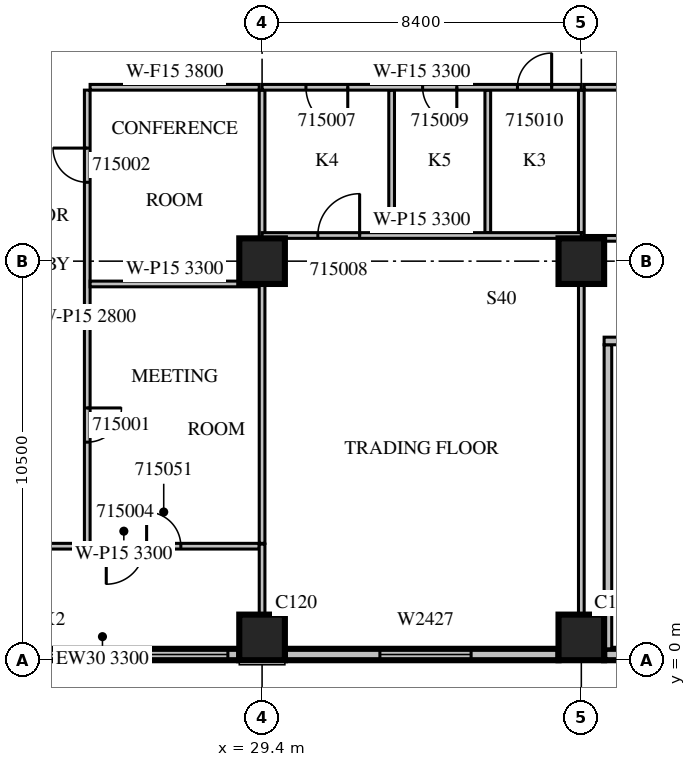
"""IFC4 building model, lengths in metres.
Left out: names, types, materials, properties, quantities, classifications, styles, units other than length and angle.
Written with IfcOpenShell. Run it as: python <this file> out.ifc"""

import sys

from ifc_helpers import new_model, si_unit, direction, frame, frame_2d, origin, origin_2d, place, context, subcontext, project, spatial, rectangle, extrude, source, transform, mapped, element, fill, save


model = new_model("IFC4")
c1 = context("Model", 3, precision=1e-05, world=origin(), true_north=direction((0.0, 1.0)))
c2 = subcontext(c1, "Body", "Model", "MODEL_VIEW")
j1 = project(units=[si_unit("LENGTHUNIT", "METRE"), si_unit("PLANEANGLEUNIT", "RADIAN")], contexts=[c1])
p1 = place(None, origin())
s1 = spatial("IfcSite", under=j1, at=p1, CompositionType="ELEMENT")
p2 = place(p1, origin())
s2 = spatial("IfcBuilding", under=s1, at=p2, CompositionType="ELEMENT")
p3 = place(p2, frame((0.0, 0.0, 74.1)))
s3 = spatial("IfcBuildingStorey", under=s2, at=p3, CompositionType="ELEMENT", Elevation=74.1)
m1 = source(origin(), c2, "Body", "SweptSolid", [
    extrude(rectangle(XDim=1.2, YDim=1.2, at=origin_2d()), origin(), (0.0, 0.0, 1.0), 4.2),
])
for number, where, z_axis, x_axis in (
    (1, (29.4, 0.6, 0.0), (0.0, 0.0, 1.0), (1.0, 0.0, 0.0)),
    (2, (37.8, 0.6, 0.0), (0.0, 0.0, 1.0), (1.0, 0.0, 0.0)),
    (3, (29.4, 10.5, 0.0), (0.0, 0.0, 1.0), (1.0, 0.0, 0.0)),
    (4, (37.8, 10.5, 0.0), (0.0, 0.0, 1.0), (1.0, 0.0, 0.0)),
):
    element("IfcColumn", number, at=place(p3, frame(where, z_axis=z_axis, x_axis=x_axis)), inside=s3, PredefinedType="COLUMN", context=c2, shape_type="MappedRepresentation", body=[
        mapped(m1, transform((0.0, 0.0, 0.0), scale=1.0)),
    ])
m2 = source(origin(), c2, "Body", "SweptSolid", [
    extrude(rectangle(XDim=7.2, YDim=0.3, at=frame_2d((3.6, 0.0))), origin(), (0.0, 0.0, 1.0), 3.3),
])
p4 = place(p3, frame((21.6, 0.15, 0.0), z_axis=(0.0, 0.0, 1.0), x_axis=(1.0, 0.0, 0.0)))
e5 = element("IfcWall", 5, at=p4, inside=s3, PredefinedType="STANDARD", context=c2, shape_type="MappedRepresentation", body=[
    mapped(m2, transform((0.0, 0.0, 0.0), scale=1.0)),
])
m3 = source(origin(), c2, "Body", "SweptSolid", [
    extrude(rectangle(XDim=2.4, YDim=2.7, at=frame_2d((1.2, 1.35))), frame((0.0, 0.16, 0.0), z_axis=(0.0, -1.0, 0.0), x_axis=(1.0, 0.0, 0.0)), (0.0, 0.0, 1.0), 0.32),
])
p5 = place(p4, frame((0.3, 0.0, 0.6)))
e6 = element("IfcOpeningElement", 6, at=p5, cuts=e5, PredefinedType="OPENING", context=c2, shape_type="MappedRepresentation", body=[
    mapped(m3, transform((0.0, 0.0, 0.0), scale=1.0)),
])
p6 = place(p4, frame((4.5, 0.0, 0.6)))
e7 = element("IfcOpeningElement", 7, at=p6, cuts=e5, PredefinedType="OPENING", context=c2, shape_type="MappedRepresentation", body=[
    mapped(m3, transform((0.0, 0.0, 0.0), scale=1.0)),
])
m4 = source(origin(), c2, "Body", "SweptSolid", [
    extrude(rectangle(XDim=7.2, YDim=0.3, at=frame_2d((3.6, 0.0))), origin(), (0.0, 0.0, 1.0), 3.8),
])
p7 = place(p3, frame((30.0, 0.15, 0.0), z_axis=(0.0, 0.0, 1.0), x_axis=(1.0, 0.0, 0.0)))
e8 = element("IfcWall", 8, at=p7, inside=s3, PredefinedType="STANDARD", context=c2, shape_type="MappedRepresentation", body=[
    mapped(m4, transform((0.0, 0.0, 0.0), scale=1.0)),
])
p8 = place(p7, frame((2.5, 0.0, 0.6)))
e9 = element("IfcOpeningElement", 9, at=p8, cuts=e8, PredefinedType="OPENING", context=c2, shape_type="MappedRepresentation", body=[
    mapped(m3, transform((0.0, 0.0, 0.0), scale=1.0)),
])
m5 = source(origin(), c2, "Body", "SweptSolid", [
    extrude(rectangle(XDim=1.8, YDim=0.3, at=frame_2d((0.9, 0.0))), origin(), (0.0, 0.0, 1.0), 3.8),
])
p9 = place(p3, frame((38.4, 0.15, 0.0), z_axis=(0.0, 0.0, 1.0), x_axis=(1.0, 0.0, 0.0)))
e10 = element("IfcWall", 10, at=p9, inside=s3, PredefinedType="STANDARD", context=c2, shape_type="MappedRepresentation", body=[
    mapped(m5, transform((0.0, 0.0, 0.0), scale=1.0)),
])
m6 = source(origin(), c2, "Body", "SweptSolid", [
    extrude(rectangle(XDim=8.0, YDim=0.2, at=frame_2d((4.0, 0.0))), origin(), (0.0, 0.0, 1.0), 3.8),
])
p10 = place(p3, frame((38.5, 0.3, 0.0), z_axis=(0.0, 0.0, 1.0), x_axis=(0.0, 1.0, 0.0)))
e11 = element("IfcWall", 11, at=p10, inside=s3, PredefinedType="PARTITIONING", context=c2, shape_type="MappedRepresentation", body=[
    mapped(m6, transform((0.0, 0.0, 0.0), scale=1.0)),
])
m7 = source(origin(), c2, "Body", "SweptSolid", [
    extrude(rectangle(XDim=5.45, YDim=0.2, at=frame_2d((2.725, 0.0))), origin(), (0.0, 0.0, 1.0), 3.8),
])
p11 = place(p3, frame((38.4, 8.4, 0.0), z_axis=(0.0, 0.0, 1.0), x_axis=(1.0, 0.0, 0.0)))
e12 = element("IfcWall", 12, at=p11, inside=s3, PredefinedType="PARTITIONING", context=c2, shape_type="MappedRepresentation", body=[
    mapped(m7, transform((0.0, 0.0, 0.0), scale=1.0)),
])
m8 = source(origin(), c2, "Body", "SweptSolid", [
    extrude(rectangle(XDim=1.2, YDim=2.1, at=frame_2d((0.6, 1.05))), frame((0.0, 0.11, 0.0), z_axis=(0.0, -1.0, 0.0), x_axis=(1.0, 0.0, 0.0)), (0.0, 0.0, 1.0), 0.22),
])
p12 = place(p11, frame((0.4, 0.0, 0.0)))
e13 = element("IfcOpeningElement", 13, at=p12, cuts=e12, PredefinedType="OPENING", context=c2, shape_type="MappedRepresentation", body=[
    mapped(m8, transform((0.0, 0.0, 0.0), scale=1.0)),
])
m9 = source(origin(), c2, "Body", "SweptSolid", [
    extrude(rectangle(XDim=0.9, YDim=2.1, at=frame_2d((0.45, 1.05))), frame((0.0, 0.11, 0.0), z_axis=(0.0, -1.0, 0.0), x_axis=(1.0, 0.0, 0.0)), (0.0, 0.0, 1.0), 0.22),
])
p13 = place(p11, frame((3.25, 0.0, 0.0)))
e14 = element("IfcOpeningElement", 14, at=p13, cuts=e12, PredefinedType="OPENING", context=c2, shape_type="MappedRepresentation", body=[
    mapped(m9, transform((0.0, 0.0, 0.0), scale=1.0)),
])
m10 = source(origin(), c2, "Body", "SweptSolid", [
    extrude(rectangle(XDim=11.925, YDim=0.15, at=frame_2d((5.963, 0.0))), origin(), (0.0, 0.0, 1.0), 2.8),
])
p14 = place(p3, frame((24.8, 15.0, 0.0), z_axis=(0.0, 0.0, 1.0), x_axis=(0.0, -1.0, 0.0)))
e15 = element("IfcWall", 15, at=p14, inside=s3, PredefinedType="PARTITIONING", context=c2, shape_type="MappedRepresentation", body=[
    mapped(m10, transform((0.0, 0.0, 0.0), scale=1.0)),
])
m11 = source(origin(), c2, "Body", "SweptSolid", [
    extrude(rectangle(XDim=0.9, YDim=2.1, at=frame_2d((0.45, 1.05))), frame((0.0, 0.085, 0.0), z_axis=(0.0, -1.0, 0.0), x_axis=(1.0, 0.0, 0.0)), (0.0, 0.0, 1.0), 0.17),
])
p15 = place(p14, frame((8.363, 0.0, 0.0)))
e16 = element("IfcOpeningElement", 16, at=p15, cuts=e15, PredefinedType="OPENING", context=c2, shape_type="MappedRepresentation", body=[
    mapped(m11, transform((0.0, 0.0, 0.0), scale=1.0)),
])
p16 = place(p14, frame((1.525, 0.0, 0.0)))
e17 = element("IfcOpeningElement", 17, at=p16, cuts=e15, PredefinedType="OPENING", context=c2, shape_type="MappedRepresentation", body=[
    mapped(m11, transform((0.0, 0.0, 0.0), scale=1.0)),
])
p17 = place(p3, frame((29.325, 9.9, 0.0), z_axis=(0.0, 0.0, 1.0), x_axis=(-1.0, 0.0, 0.0)))
e18 = element("IfcWall", 18, at=p17, inside=s3, PredefinedType="PARTITIONING", context=c2, shape_type="SweptSolid", body=[
    extrude(rectangle(XDim=4.45, YDim=0.15, at=frame_2d((2.225, 0.0))), origin(), (0.0, 0.0, 1.0), 3.3),
])
m12 = source(origin(), c2, "Body", "SweptSolid", [
    extrude(rectangle(XDim=4.45, YDim=0.15, at=frame_2d((2.225, 0.0))), origin(), (0.0, 0.0, 1.0), 3.8),
])
p18 = place(p3, frame((29.325, 15.075, 0.0), z_axis=(0.0, 0.0, 1.0), x_axis=(-1.0, 0.0, 0.0)))
e19 = element("IfcWall", 19, at=p18, inside=s3, PredefinedType="PARTITIONING", context=c2, shape_type="MappedRepresentation", body=[
    mapped(m12, transform((0.0, 0.0, 0.0), scale=1.0)),
])
m13 = source(origin(), c2, "Body", "SweptSolid", [
    extrude(rectangle(XDim=6.826, YDim=0.15, at=frame_2d((3.413, 0.0))), origin(), (0.0, 0.0, 1.0), 3.8),
])
p19 = place(p3, frame((29.4, 3.075, 0.0), z_axis=(0.0, 0.0, 1.0), x_axis=(0.0, 1.0, 0.0)))
e20 = element("IfcWall", 20, at=p19, inside=s3, PredefinedType="PARTITIONING", context=c2, shape_type="MappedRepresentation", body=[
    mapped(m13, transform((0.0, 0.0, 0.0), scale=1.0)),
])
m14 = source(origin(), c2, "Body", "SweptSolid", [
    extrude(rectangle(XDim=3.901, YDim=0.15, at=frame_2d((1.95, 0.0))), origin(), (0.0, 0.0, 1.0), 3.8),
])
p20 = place(p3, frame((29.4, 11.099, 0.0), z_axis=(0.0, 0.0, 1.0), x_axis=(0.0, 1.0, 0.0)))
e21 = element("IfcWall", 21, at=p20, inside=s3, PredefinedType="PARTITIONING", context=c2, shape_type="MappedRepresentation", body=[
    mapped(m14, transform((0.0, 0.0, 0.0), scale=1.0)),
])
m15 = source(origin(), c2, "Body", "SweptSolid", [
    extrude(rectangle(XDim=7.125, YDim=0.15, at=frame_2d((3.562, 0.0))), origin(), (0.0, 0.0, 1.0), 3.3),
])
p21 = place(p3, frame((22.2, 3.0, 0.0), z_axis=(0.0, 0.0, 1.0), x_axis=(1.0, 0.0, 0.0)))
e22 = element("IfcWall", 22, at=p21, inside=s3, PredefinedType="PARTITIONING", context=c2, shape_type="MappedRepresentation", body=[
    mapped(m15, transform((0.0, 0.0, 0.0), scale=1.0)),
])
m16 = source(origin(), c2, "Body", "SweptSolid", [
    extrude(rectangle(XDim=1.0, YDim=2.1, at=frame_2d((0.5, 1.05))), frame((0.0, 0.085, 0.0), z_axis=(0.0, -1.0, 0.0), x_axis=(1.0, 0.0, 0.0)), (0.0, 0.0, 1.0), 0.17),
])
p22 = place(p21, frame((3.1, 0.0, 0.0)))
e23 = element("IfcOpeningElement", 23, at=p22, cuts=e22, PredefinedType="OPENING", context=c2, shape_type="MappedRepresentation", body=[
    mapped(m16, transform((0.0, 0.0, 0.0), scale=1.0)),
])
p23 = place(p21, frame((4.162, 0.0, 0.0)))
e24 = element("IfcOpeningElement", 24, at=p23, cuts=e22, PredefinedType="OPENING", context=c2, shape_type="MappedRepresentation", body=[
    mapped(m11, transform((0.0, 0.0, 0.0), scale=1.0)),
])
m17 = source(origin(), c2, "Body", "SweptSolid", [
    extrude(rectangle(XDim=6.45, YDim=0.15, at=frame_2d((3.225, 0.0))), origin(), (0.0, 0.0, 1.0), 3.8),
])
p24 = place(p3, frame((37.875, 11.1, 0.0), z_axis=(0.0, 0.0, 1.0), x_axis=(1.0, 0.0, 0.0)))
e25 = element("IfcWall", 25, at=p24, inside=s3, PredefinedType="PARTITIONING", context=c2, shape_type="MappedRepresentation", body=[
    mapped(m17, transform((0.0, 0.0, 0.0), scale=1.0)),
])
p25 = place(p3, frame((44.325, 15.075, 0.0), z_axis=(0.0, 0.0, 1.0), x_axis=(-1.0, 0.0, 0.0)))
e26 = element("IfcWall", 26, at=p25, inside=s3, PredefinedType="PARTITIONING", context=c2, shape_type="MappedRepresentation", body=[
    mapped(m17, transform((0.0, 0.0, 0.0), scale=1.0)),
])
p26 = place(p25, frame((2.812, 0.0, 0.0)))
e27 = element("IfcOpeningElement", 27, at=p26, cuts=e26, PredefinedType="OPENING", context=c2, shape_type="MappedRepresentation", body=[
    mapped(m11, transform((0.0, 0.0, 0.0), scale=1.0)),
])
m18 = source(origin(), c2, "Body", "SweptSolid", [
    extrude(rectangle(XDim=3.75, YDim=0.15, at=frame_2d((1.875, 0.0))), origin(), (0.0, 0.0, 1.0), 3.8),
])
for number, where, z_axis, x_axis in (
    (28, (32.809, 11.25, 0.0), (0.0, 0.0, 1.0), (0.0, 1.0, 0.0)),
    (29, (35.339, 11.25, 0.0), (0.0, 0.0, 1.0), (0.0, 1.0, 0.0)),
):
    element("IfcWall", number, at=place(p3, frame(where, z_axis=z_axis, x_axis=x_axis)), inside=s3, PredefinedType="PARTITIONING", context=c2, shape_type="MappedRepresentation", body=[
        mapped(m18, transform((0.0, 0.0, 0.0), scale=1.0)),
    ])
m19 = source(origin(), c2, "Body", "SweptSolid", [
    extrude(rectangle(XDim=1.856, YDim=0.15, at=frame_2d((0.928, 0.0))), origin(), (0.0, 0.0, 1.0), 3.8),
])
p27 = place(p3, frame((29.4, 1.199, 0.0), z_axis=(0.0, 0.0, 1.0), x_axis=(0.0, 1.0, 0.0)))
e30 = element("IfcWall", 30, at=p27, inside=s3, PredefinedType="PARTITIONING", context=c2, shape_type="MappedRepresentation", body=[
    mapped(m19, transform((0.0, 0.0, 0.0), scale=1.0)),
])
m20 = source(origin(), c2, "Body", "SweptSolid", [
    extrude(rectangle(XDim=8.702, YDim=0.15, at=frame_2d((4.351, 0.0))), origin(), (0.0, 0.0, 1.0), 3.8),
])
p28 = place(p3, frame((37.8, 1.199, 0.0), z_axis=(0.0, 0.0, 1.0), x_axis=(0.0, 1.0, 0.0)))
e31 = element("IfcWall", 31, at=p28, inside=s3, PredefinedType="PARTITIONING", context=c2, shape_type="MappedRepresentation", body=[
    mapped(m20, transform((0.0, 0.0, 0.0), scale=1.0)),
])
p29 = place(p3, frame((37.8, 11.25, 0.0), z_axis=(0.0, 0.0, 1.0), x_axis=(0.0, 1.0, 0.0)))
e32 = element("IfcWall", 32, at=p29, inside=s3, PredefinedType="PARTITIONING", context=c2, shape_type="MappedRepresentation", body=[
    mapped(m18, transform((0.0, 0.0, 0.0), scale=1.0)),
])
m21 = source(origin(), c2, "Body", "SweptSolid", [
    extrude(rectangle(XDim=8.4, YDim=0.15, at=frame_2d((4.2, 0.0))), origin(), (0.0, 0.0, 1.0), 3.3),
])
p30 = place(p3, frame((37.8, 11.175, 0.0), z_axis=(0.0, 0.0, 1.0), x_axis=(-1.0, 0.0, 0.0)))
e33 = element("IfcWall", 33, at=p30, inside=s3, PredefinedType="PARTITIONING", context=c2, shape_type="MappedRepresentation", body=[
    mapped(m21, transform((0.0, 0.0, 0.0), scale=1.0)),
])
m22 = source(origin(), c2, "Body", "SweptSolid", [
    extrude(rectangle(XDim=1.1, YDim=2.1, at=frame_2d((0.55, 1.05))), frame((0.0, 0.085, 0.0), z_axis=(0.0, -1.0, 0.0), x_axis=(1.0, 0.0, 0.0)), (0.0, 0.0, 1.0), 0.17),
])
p31 = place(p30, frame((5.833, 0.0, 0.0)))
e34 = element("IfcOpeningElement", 34, at=p31, cuts=e33, PredefinedType="OPENING", context=c2, shape_type="MappedRepresentation", body=[
    mapped(m22, transform((0.0, 0.0, 0.0), scale=1.0)),
])
p32 = place(p3, frame((37.8, 15.075, 0.0), z_axis=(0.0, 0.0, 1.0), x_axis=(-1.0, 0.0, 0.0)))
e35 = element("IfcWall", 35, at=p32, inside=s3, PredefinedType="PARTITIONING", context=c2, shape_type="MappedRepresentation", body=[
    mapped(m21, transform((0.0, 0.0, 0.0), scale=1.0)),
])
p33 = place(p32, frame((6.146, 0.0, 0.0)))
e36 = element("IfcOpeningElement", 36, at=p33, cuts=e35, PredefinedType="OPENING", context=c2, shape_type="MappedRepresentation", body=[
    mapped(m22, transform((0.0, 0.0, 0.0), scale=1.0)),
])
p34 = place(p32, frame((3.276, 0.0, 0.0)))
e37 = element("IfcOpeningElement", 37, at=p34, cuts=e35, PredefinedType="OPENING", context=c2, shape_type="MappedRepresentation", body=[
    mapped(m11, transform((0.0, 0.0, 0.0), scale=1.0)),
])
p35 = place(p32, frame((0.781, 0.0, 0.0)))
e38 = element("IfcOpeningElement", 38, at=p35, cuts=e35, PredefinedType="OPENING", context=c2, shape_type="MappedRepresentation", body=[
    mapped(m11, transform((0.0, 0.0, 0.0), scale=1.0)),
])
m23 = source(origin(), c2, "Body", "SweptSolid", [
    extrude(rectangle(XDim=2.4, YDim=2.7, at=frame_2d((1.2, 1.35))), frame((0.0, 0.03, 0.0), z_axis=(0.0, -1.0, 0.0), x_axis=(1.0, 0.0, 0.0)), (0.0, 0.0, 1.0), 0.06),
])
p36 = place(p5, origin())
e39 = element("IfcWindow", 39, at=p36, inside=s3, PartitioningType="SINGLE_PANEL", PredefinedType="WINDOW", context=c2, shape_type="MappedRepresentation", body=[
    mapped(m23, transform((0.0, 0.0, 0.0), scale=1.0)),
])
fill(e6, e39)
p37 = place(p6, origin())
e40 = element("IfcWindow", 40, at=p37, inside=s3, PartitioningType="SINGLE_PANEL", PredefinedType="WINDOW", context=c2, shape_type="MappedRepresentation", body=[
    mapped(m23, transform((0.0, 0.0, 0.0), scale=1.0)),
])
fill(e7, e40)
p38 = place(p8, origin())
e41 = element("IfcWindow", 41, at=p38, inside=s3, PartitioningType="SINGLE_PANEL", PredefinedType="WINDOW", context=c2, shape_type="MappedRepresentation", body=[
    mapped(m23, transform((0.0, 0.0, 0.0), scale=1.0)),
])
fill(e9, e41)
m24 = source(origin(), c2, "Body", "SweptSolid", [
    extrude(rectangle(XDim=0.9, YDim=2.1, at=frame_2d((0.45, 1.05))), frame((0.0, 0.025, 0.0), z_axis=(0.0, -1.0, 0.0), x_axis=(1.0, 0.0, 0.0)), (0.0, 0.0, 1.0), 0.05),
])
p39 = place(p15, origin())
e42 = element("IfcDoor", 42, at=p39, inside=s3, OperationType="SINGLE_SWING_LEFT", PredefinedType="DOOR", context=c2, shape_type="MappedRepresentation", body=[
    mapped(m24, transform((0.0, 0.0, 0.0), scale=1.0)),
])
fill(e16, e42)
p40 = place(p16, origin())
e43 = element("IfcDoor", 43, at=p40, inside=s3, OperationType="SINGLE_SWING_RIGHT", PredefinedType="DOOR", context=c2, shape_type="MappedRepresentation", body=[
    mapped(m24, transform((0.0, 0.0, 0.0), scale=1.0)),
])
fill(e17, e43)
m25 = source(origin(), c2, "Body", "SweptSolid", [
    extrude(rectangle(XDim=1.0, YDim=2.1, at=frame_2d((0.5, 1.05))), frame((0.0, 0.025, 0.0), z_axis=(0.0, -1.0, 0.0), x_axis=(1.0, 0.0, 0.0)), (0.0, 0.0, 1.0), 0.05),
])
p41 = place(p22, origin())
e44 = element("IfcDoor", 44, at=p41, inside=s3, OperationType="SINGLE_SWING_RIGHT", PredefinedType="DOOR", context=c2, shape_type="MappedRepresentation", body=[
    mapped(m25, transform((0.0, 0.0, 0.0), scale=1.0)),
])
fill(e23, e44)
m26 = source(origin(), c2, "Body", "SweptSolid", [
    extrude(rectangle(XDim=1.1, YDim=2.1, at=frame_2d((0.55, 1.05))), frame((0.0, 0.025, 0.0), z_axis=(0.0, -1.0, 0.0), x_axis=(1.0, 0.0, 0.0)), (0.0, 0.0, 1.0), 0.05),
])
p42 = place(p33, origin())
e45 = element("IfcDoor", 45, at=p42, inside=s3, OperationType="SINGLE_SWING_LEFT", PredefinedType="DOOR", context=c2, shape_type="MappedRepresentation", body=[
    mapped(m26, transform((0.0, 0.0, 0.0), scale=1.0)),
])
fill(e36, e45)
p43 = place(p31, origin())
e46 = element("IfcDoor", 46, at=p43, inside=s3, OperationType="SINGLE_SWING_RIGHT", PredefinedType="DOOR", context=c2, shape_type="MappedRepresentation", body=[
    mapped(m26, transform((0.0, 0.0, 0.0), scale=1.0)),
])
fill(e34, e46)
p44 = place(p34, origin())
e47 = element("IfcDoor", 47, at=p44, inside=s3, OperationType="SINGLE_SWING_LEFT", PredefinedType="DOOR", context=c2, shape_type="MappedRepresentation", body=[
    mapped(m24, transform((0.0, 0.0, 0.0), scale=1.0)),
])
fill(e37, e47)
p45 = place(p35, origin())
e48 = element("IfcDoor", 48, at=p45, inside=s3, OperationType="SINGLE_SWING_RIGHT", PredefinedType="DOOR", context=c2, shape_type="MappedRepresentation", body=[
    mapped(m24, transform((0.0, 0.0, 0.0), scale=1.0)),
])
fill(e38, e48)
p46 = place(p23, origin())
e49 = element("IfcDoor", 49, at=p46, inside=s3, OperationType="SINGLE_SWING_LEFT", PredefinedType="DOOR", context=c2, shape_type="MappedRepresentation", body=[
    mapped(m24, transform((0.0, 0.0, 0.0), scale=1.0)),
])
fill(e24, e49)
save(model, sys.argv[1])
